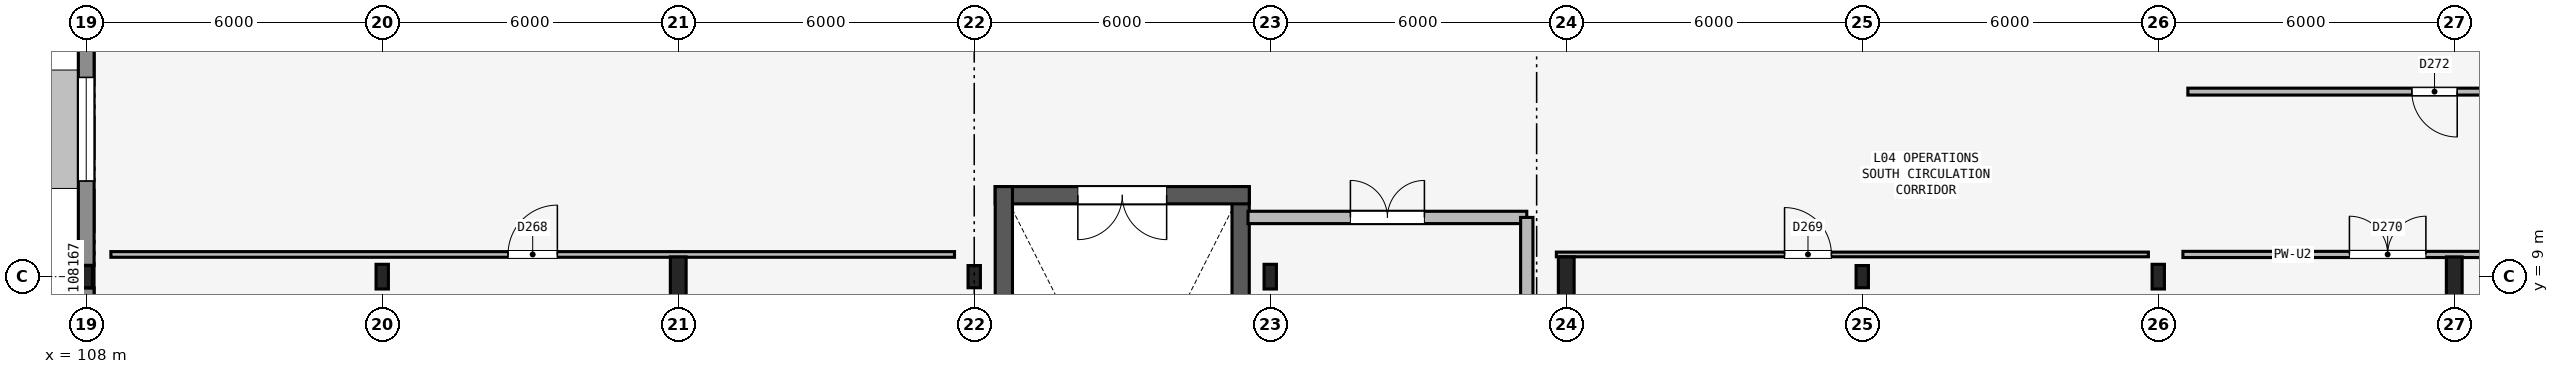
"""IFC4 building model, lengths in metres.
Left out: names, types, materials, properties, quantities, classifications, styles, units other than length and angle.
Written with IfcOpenShell. Run it as: python <this file> out.ifc"""

import sys

from ifc_helpers import new_model, si_unit, direction, frame, frame_2d, origin, origin_2d, place, context, subcontext, project, spatial, rectangle, i_section, extrude, element, fill, save


model = new_model("IFC4")
c1 = context("Model", 3, precision=1e-05, world=origin(), true_north=direction((0.0, 1.0)))
c2 = subcontext(c1, "Body", "Model", "MODEL_VIEW")
j1 = project(units=[si_unit("LENGTHUNIT", "METRE"), si_unit("PLANEANGLEUNIT", "RADIAN")], contexts=[c1])
p1 = place(None, origin())
s1 = spatial("IfcSite", under=j1, at=p1, CompositionType="ELEMENT")
p2 = place(p1, origin())
s2 = spatial("IfcBuilding", under=s1, at=p2, CompositionType="ELEMENT")
p3 = place(p2, frame((0.0, 0.0, 18.0)))
s3 = spatial("IfcBuildingStorey", under=s2, at=p3, CompositionType="ELEMENT", Elevation=18.0)
p4 = place(p3, frame((108.0, 9.0, 0.0), z_axis=(0.0, 0.0, 1.0), x_axis=(1.0, 0.0, 0.0)))
e1 = element("IfcColumn", 1, at=p4, inside=s3, PredefinedType="COLUMN", context=c2, shape_type="SweptSolid", body=[
    extrude(i_section(OverallWidth=0.25, OverallDepth=0.45, WebThickness=0.011, FlangeThickness=0.014, FilletRadius=0.015, at=origin_2d()), origin(), (0.0, 0.0, 1.0), 4.2),
])
p5 = place(p3, frame((114.0, 9.0, 0.0), z_axis=(0.0, 0.0, 1.0), x_axis=(1.0, 0.0, 0.0)))
e2 = element("IfcColumn", 2, at=p5, inside=s3, PredefinedType="COLUMN", context=c2, shape_type="SweptSolid", body=[
    extrude(i_section(OverallWidth=0.25, OverallDepth=0.5, WebThickness=0.01, FlangeThickness=0.015, FilletRadius=0.015, at=origin_2d()), origin(), (0.0, 0.0, 1.0), 4.2),
])
p6 = place(p3, frame((120.0, 9.0, 0.0), z_axis=(0.0, 0.0, 1.0), x_axis=(1.0, 0.0, 0.0)))
e3 = element("IfcColumn", 3, at=p6, inside=s3, PredefinedType="COLUMN", context=c2, shape_type="SweptSolid", body=[
    extrude(i_section(OverallWidth=0.32, OverallDepth=0.8, WebThickness=0.016, FlangeThickness=0.028, at=origin_2d()), origin(), (0.0, 0.0, 1.0), 4.2),
])
p7 = place(p3, frame((126.0, 9.0, 0.0), z_axis=(0.0, 0.0, 1.0), x_axis=(1.0, 0.0, 0.0)))
e4 = element("IfcColumn", 4, at=p7, inside=s3, PredefinedType="COLUMN", context=c2, shape_type="SweptSolid", body=[
    extrude(i_section(OverallWidth=0.25, OverallDepth=0.45, WebThickness=0.011, FlangeThickness=0.014, FilletRadius=0.015, at=origin_2d()), origin(), (0.0, 0.0, 1.0), 4.2),
])
p8 = place(p3, frame((132.0, 9.0, 0.0), z_axis=(0.0, 0.0, 1.0), x_axis=(1.0, 0.0, 0.0)))
e5 = element("IfcColumn", 5, at=p8, inside=s3, PredefinedType="COLUMN", context=c2, shape_type="SweptSolid", body=[
    extrude(i_section(OverallWidth=0.25, OverallDepth=0.5, WebThickness=0.01, FlangeThickness=0.015, FilletRadius=0.015, at=origin_2d()), origin(), (0.0, 0.0, 1.0), 4.2),
])
p9 = place(p3, frame((138.0, 9.0, 0.0), z_axis=(0.0, 0.0, 1.0), x_axis=(1.0, 0.0, 0.0)))
e6 = element("IfcColumn", 6, at=p9, inside=s3, PredefinedType="COLUMN", context=c2, shape_type="SweptSolid", body=[
    extrude(i_section(OverallWidth=0.32, OverallDepth=0.8, WebThickness=0.016, FlangeThickness=0.028, at=origin_2d()), origin(), (0.0, 0.0, 1.0), 4.2),
])
p10 = place(p3, frame((144.0, 9.0, 0.0), z_axis=(0.0, 0.0, 1.0), x_axis=(1.0, 0.0, 0.0)))
e7 = element("IfcColumn", 7, at=p10, inside=s3, PredefinedType="COLUMN", context=c2, shape_type="SweptSolid", body=[
    extrude(i_section(OverallWidth=0.25, OverallDepth=0.45, WebThickness=0.011, FlangeThickness=0.014, FilletRadius=0.015, at=origin_2d()), origin(), (0.0, 0.0, 1.0), 4.2),
])
p11 = place(p3, frame((150.0, 9.0, 0.0), z_axis=(0.0, 0.0, 1.0), x_axis=(1.0, 0.0, 0.0)))
e8 = element("IfcColumn", 8, at=p11, inside=s3, PredefinedType="COLUMN", context=c2, shape_type="SweptSolid", body=[
    extrude(i_section(OverallWidth=0.25, OverallDepth=0.5, WebThickness=0.01, FlangeThickness=0.015, FilletRadius=0.015, at=origin_2d()), origin(), (0.0, 0.0, 1.0), 4.2),
])
p12 = place(p3, frame((156.0, 9.0, 0.0), z_axis=(0.0, 0.0, 1.0), x_axis=(1.0, 0.0, 0.0)))
e9 = element("IfcColumn", 9, at=p12, inside=s3, PredefinedType="COLUMN", context=c2, shape_type="SweptSolid", body=[
    extrude(i_section(OverallWidth=0.32, OverallDepth=0.8, WebThickness=0.016, FlangeThickness=0.028, at=origin_2d()), origin(), (0.0, 0.0, 1.0), 4.2),
])
p13 = place(p3, frame((108.0, 6.8, 0.0), z_axis=(0.0, 0.0, 1.0), x_axis=(0.0, 1.0, 0.0)))
e10 = element("IfcWall", 10, at=p13, inside=s3, PredefinedType="SOLIDWALL", context=c2, shape_type="SweptSolid", body=[
    extrude(rectangle(XDim=1.971, YDim=0.32, at=frame_2d((0.985, 0.0))), origin(), (0.0, 0.0, 1.0), 3.44),
])
p14 = place(p3, frame((108.0, 9.229, 0.0), z_axis=(0.0, 0.0, 1.0), x_axis=(0.0, 1.0, 0.0)))
e11 = element("IfcWall", 11, at=p14, inside=s3, PredefinedType="SOLIDWALL", context=c2, shape_type="SweptSolid", body=[
    extrude(rectangle(XDim=5.517, YDim=0.32, at=frame_2d((2.759, 0.0))), origin(), (0.0, 0.0, 1.0), 3.44),
])
p15 = place(p14, frame((1.708, 0.0, 0.9)))
e12 = element("IfcOpeningElement", 12, at=p15, cuts=e11, PredefinedType="OPENING", context=c2, shape_type="SweptSolid", body=[
    extrude(rectangle(XDim=2.1, YDim=1.5, at=frame_2d((1.05, 0.75))), frame((0.0, 0.17, 0.0), z_axis=(0.0, -1.0, 0.0), x_axis=(1.0, 0.0, 0.0)), (0.0, 0.0, 1.0), 0.34),
])
p16 = place(p3, frame((131.4, 1.075, 0.0), z_axis=(0.0, 0.0, 1.0), x_axis=(0.0, 1.0, 0.0)))
e13 = element("IfcWall", 13, at=p16, inside=s3, PredefinedType="SHEAR", context=c2, shape_type="SweptSolid", body=[
    extrude(rectangle(XDim=9.75, YDim=0.35, at=frame_2d((4.875, 0.0))), origin(), (0.0, 0.0, 1.0), 4.06),
])
p17 = place(p3, frame((131.575, 10.65, 0.0), z_axis=(0.0, 0.0, 1.0), x_axis=(-1.0, 0.0, 0.0)))
e14 = element("IfcWall", 14, at=p17, inside=s3, PredefinedType="SHEAR", context=c2, shape_type="SweptSolid", body=[
    extrude(rectangle(XDim=5.15, YDim=0.35, at=frame_2d((2.575, 0.0))), origin(), (0.0, 0.0, 1.0), 4.06),
])
p18 = place(p17, frame((1.675, 0.0, 0.0)))
e15 = element("IfcOpeningElement", 15, at=p18, cuts=e14, PredefinedType="OPENING", context=c2, shape_type="SweptSolid", body=[
    extrude(rectangle(XDim=1.8, YDim=2.2, at=frame_2d((0.9, 1.1))), frame((0.0, 0.185, 0.0), z_axis=(0.0, -1.0, 0.0), x_axis=(1.0, 0.0, 0.0)), (0.0, 0.0, 1.0), 0.37),
])
p19 = place(p3, frame((126.6, 10.825, 0.0), z_axis=(0.0, 0.0, 1.0), x_axis=(0.0, -1.0, 0.0)))
e16 = element("IfcWall", 16, at=p19, inside=s3, PredefinedType="SHEAR", context=c2, shape_type="SweptSolid", body=[
    extrude(rectangle(XDim=9.75, YDim=0.35, at=frame_2d((4.875, 0.0))), origin(), (0.0, 0.0, 1.0), 4.06),
])
p20 = place(p3, frame((131.55, 10.2, 0.0), z_axis=(0.0, 0.0, 1.0), x_axis=(1.0, 0.0, 0.0)))
e17 = element("IfcWall", 17, at=p20, inside=s3, PredefinedType="PARTITIONING", context=c2, shape_type="SweptSolid", body=[
    extrude(rectangle(XDim=5.65, YDim=0.25, at=frame_2d((2.825, 0.0))), origin(), (0.0, 0.0, 1.0), 3.44),
])
p21 = place(p20, frame((2.075, 0.0, 0.0)))
e18 = element("IfcOpeningElement", 18, at=p21, cuts=e17, PredefinedType="OPENING", context=c2, shape_type="SweptSolid", body=[
    extrude(rectangle(XDim=1.5, YDim=2.15, at=frame_2d((0.75, 1.075))), frame((0.0, 0.135, 0.0), z_axis=(0.0, -1.0, 0.0), x_axis=(1.0, 0.0, 0.0)), (0.0, 0.0, 1.0), 0.27),
])
p22 = place(p3, frame((137.2, 5.8, 0.0), z_axis=(0.0, 0.0, 1.0), x_axis=(0.0, 1.0, 0.0)))
e19 = element("IfcWall", 19, at=p22, inside=s3, PredefinedType="PARTITIONING", context=c2, shape_type="SweptSolid", body=[
    extrude(rectangle(XDim=4.4, YDim=0.25, at=frame_2d((2.2, 0.0))), origin(), (0.0, 0.0, 1.0), 3.34),
])
p23 = place(p3, frame((108.5, 9.45, 0.0), z_axis=(0.0, 0.0, 1.0), x_axis=(1.0, 0.0, 0.0)))
e20 = element("IfcWall", 20, at=p23, inside=s3, PredefinedType="PARTITIONING", context=c2, shape_type="SweptSolid", body=[
    extrude(rectangle(XDim=17.1, YDim=0.115, at=frame_2d((8.55, 0.0))), origin(), (0.0, 0.0, 1.0), 3.44),
])
p24 = place(p23, frame((8.05, 0.0, 0.0)))
e21 = element("IfcOpeningElement", 21, at=p24, cuts=e20, PredefinedType="OPENING", context=c2, shape_type="SweptSolid", body=[
    extrude(rectangle(XDim=1.0, YDim=2.15, at=frame_2d((0.5, 1.075))), frame((0.0, 0.067, 0.0), z_axis=(0.0, -1.0, 0.0), x_axis=(1.0, 0.0, 0.0)), (0.0, 0.0, 1.0), 0.135),
])
p25 = place(p3, frame((137.8, 9.45, 0.0), z_axis=(0.0, 0.0, 1.0), x_axis=(1.0, 0.0, 0.0)))
e22 = element("IfcWall", 22, at=p25, inside=s3, PredefinedType="PARTITIONING", context=c2, shape_type="SweptSolid", body=[
    extrude(rectangle(XDim=12.0, YDim=0.095, at=frame_2d((6.0, 0.0))), origin(), (0.0, 0.0, 1.0), 3.44),
])
p26 = place(p25, frame((4.625, 0.0, 0.0)))
e23 = element("IfcOpeningElement", 23, at=p26, cuts=e22, PredefinedType="OPENING", context=c2, shape_type="SweptSolid", body=[
    extrude(rectangle(XDim=0.95, YDim=2.15, at=frame_2d((0.475, 1.075))), frame((0.0, 0.057, 0.0), z_axis=(0.0, -1.0, 0.0), x_axis=(1.0, 0.0, 0.0)), (0.0, 0.0, 1.0), 0.115),
])
p27 = place(p3, frame((150.5, 9.45, 0.0), z_axis=(0.0, 0.0, 1.0), x_axis=(1.0, 0.0, 0.0)))
e24 = element("IfcWall", 24, at=p27, inside=s3, PredefinedType="PARTITIONING", context=c2, shape_type="SweptSolid", body=[
    extrude(rectangle(XDim=10.1, YDim=0.125, at=frame_2d((5.05, 0.0))), origin(), (0.0, 0.0, 1.0), 3.44),
])
p28 = place(p27, frame((3.375, 0.0, 0.0)))
e25 = element("IfcOpeningElement", 25, at=p28, cuts=e24, PredefinedType="OPENING", context=c2, shape_type="SweptSolid", body=[
    extrude(rectangle(XDim=1.55, YDim=2.2, at=frame_2d((0.775, 1.1))), frame((0.0, 0.073, 0.0), z_axis=(0.0, -1.0, 0.0), x_axis=(1.0, 0.0, 0.0)), (0.0, 0.0, 1.0), 0.145),
])
p29 = place(p3, frame((160.6, 12.75, 0.0), z_axis=(0.0, 0.0, 1.0), x_axis=(-1.0, 0.0, 0.0)))
e26 = element("IfcWall", 26, at=p29, inside=s3, PredefinedType="PARTITIONING", context=c2, shape_type="SweptSolid", body=[
    extrude(rectangle(XDim=10.0, YDim=0.14, at=frame_2d((5.0, 0.0))), origin(), (0.0, 0.0, 1.0), 3.44),
])
p30 = place(p29, frame((4.54, 0.0, 0.0)))
e27 = element("IfcOpeningElement", 27, at=p30, cuts=e26, PredefinedType="OPENING", context=c2, shape_type="SweptSolid", body=[
    extrude(rectangle(XDim=0.92, YDim=2.1, at=frame_2d((0.46, 1.05))), frame((0.0, 0.08, 0.0), z_axis=(0.0, -1.0, 0.0), x_axis=(1.0, 0.0, 0.0)), (0.0, 0.0, 1.0), 0.16),
])
p31 = place(p15, origin())
e28 = element("IfcWindow", 28, at=p31, inside=s3, PartitioningType="SINGLE_PANEL", PredefinedType="WINDOW", context=c2, shape_type="SweptSolid", body=[
    extrude(rectangle(XDim=2.1, YDim=1.5, at=frame_2d((1.05, 0.75))), frame((0.0, 0.03, 0.0), z_axis=(0.0, -1.0, 0.0), x_axis=(1.0, 0.0, 0.0)), (0.0, 0.0, 1.0), 0.06),
])
fill(e12, e28)
p32 = place(p18, origin())
e29 = element("IfcDoor", 29, at=p32, inside=s3, OperationType="DOUBLE_DOOR_SINGLE_SWING", PredefinedType="DOOR", context=c2, shape_type="SweptSolid", body=[
    extrude(rectangle(XDim=1.8, YDim=2.2, at=frame_2d((0.9, 1.1))), frame((0.0, 0.025, 0.0), z_axis=(0.0, -1.0, 0.0), x_axis=(1.0, 0.0, 0.0)), (0.0, 0.0, 1.0), 0.05),
])
fill(e15, e29)
p33 = place(p21, origin())
e30 = element("IfcDoor", 30, at=p33, inside=s3, OperationType="DOUBLE_DOOR_SINGLE_SWING", PredefinedType="DOOR", context=c2, shape_type="SweptSolid", body=[
    extrude(rectangle(XDim=1.5, YDim=2.15, at=frame_2d((0.75, 1.075))), frame((0.0, 0.025, 0.0), z_axis=(0.0, -1.0, 0.0), x_axis=(1.0, 0.0, 0.0)), (0.0, 0.0, 1.0), 0.05),
])
fill(e18, e30)
p34 = place(p24, origin())
e31 = element("IfcDoor", 31, at=p34, inside=s3, OperationType="SINGLE_SWING_RIGHT", PredefinedType="DOOR", context=c2, shape_type="SweptSolid", body=[
    extrude(rectangle(XDim=1.0, YDim=2.15, at=frame_2d((0.5, 1.075))), frame((0.0, 0.025, 0.0), z_axis=(0.0, -1.0, 0.0), x_axis=(1.0, 0.0, 0.0)), (0.0, 0.0, 1.0), 0.05),
])
fill(e21, e31)
p35 = place(p26, origin())
e32 = element("IfcDoor", 32, at=p35, inside=s3, OperationType="SINGLE_SWING_LEFT", PredefinedType="DOOR", context=c2, shape_type="SweptSolid", body=[
    extrude(rectangle(XDim=0.95, YDim=2.15, at=frame_2d((0.475, 1.075))), frame((0.0, 0.025, 0.0), z_axis=(0.0, -1.0, 0.0), x_axis=(1.0, 0.0, 0.0)), (0.0, 0.0, 1.0), 0.05),
])
fill(e23, e32)
p36 = place(p28, origin())
e33 = element("IfcDoor", 33, at=p36, inside=s3, OperationType="DOUBLE_DOOR_SINGLE_SWING", PredefinedType="DOOR", context=c2, shape_type="SweptSolid", body=[
    extrude(rectangle(XDim=1.55, YDim=2.2, at=frame_2d((0.775, 1.1))), frame((0.0, 0.025, 0.0), z_axis=(0.0, -1.0, 0.0), x_axis=(1.0, 0.0, 0.0)), (0.0, 0.0, 1.0), 0.05),
])
fill(e25, e33)
p37 = place(p30, origin())
e34 = element("IfcDoor", 34, at=p37, inside=s3, OperationType="SINGLE_SWING_LEFT", PredefinedType="DOOR", context=c2, shape_type="SweptSolid", body=[
    extrude(rectangle(XDim=0.92, YDim=2.1, at=frame_2d((0.46, 1.05))), frame((0.0, 0.025, 0.0), z_axis=(0.0, -1.0, 0.0), x_axis=(1.0, 0.0, 0.0)), (0.0, 0.0, 1.0), 0.05),
])
fill(e27, e34)
save(model, sys.argv[1])
